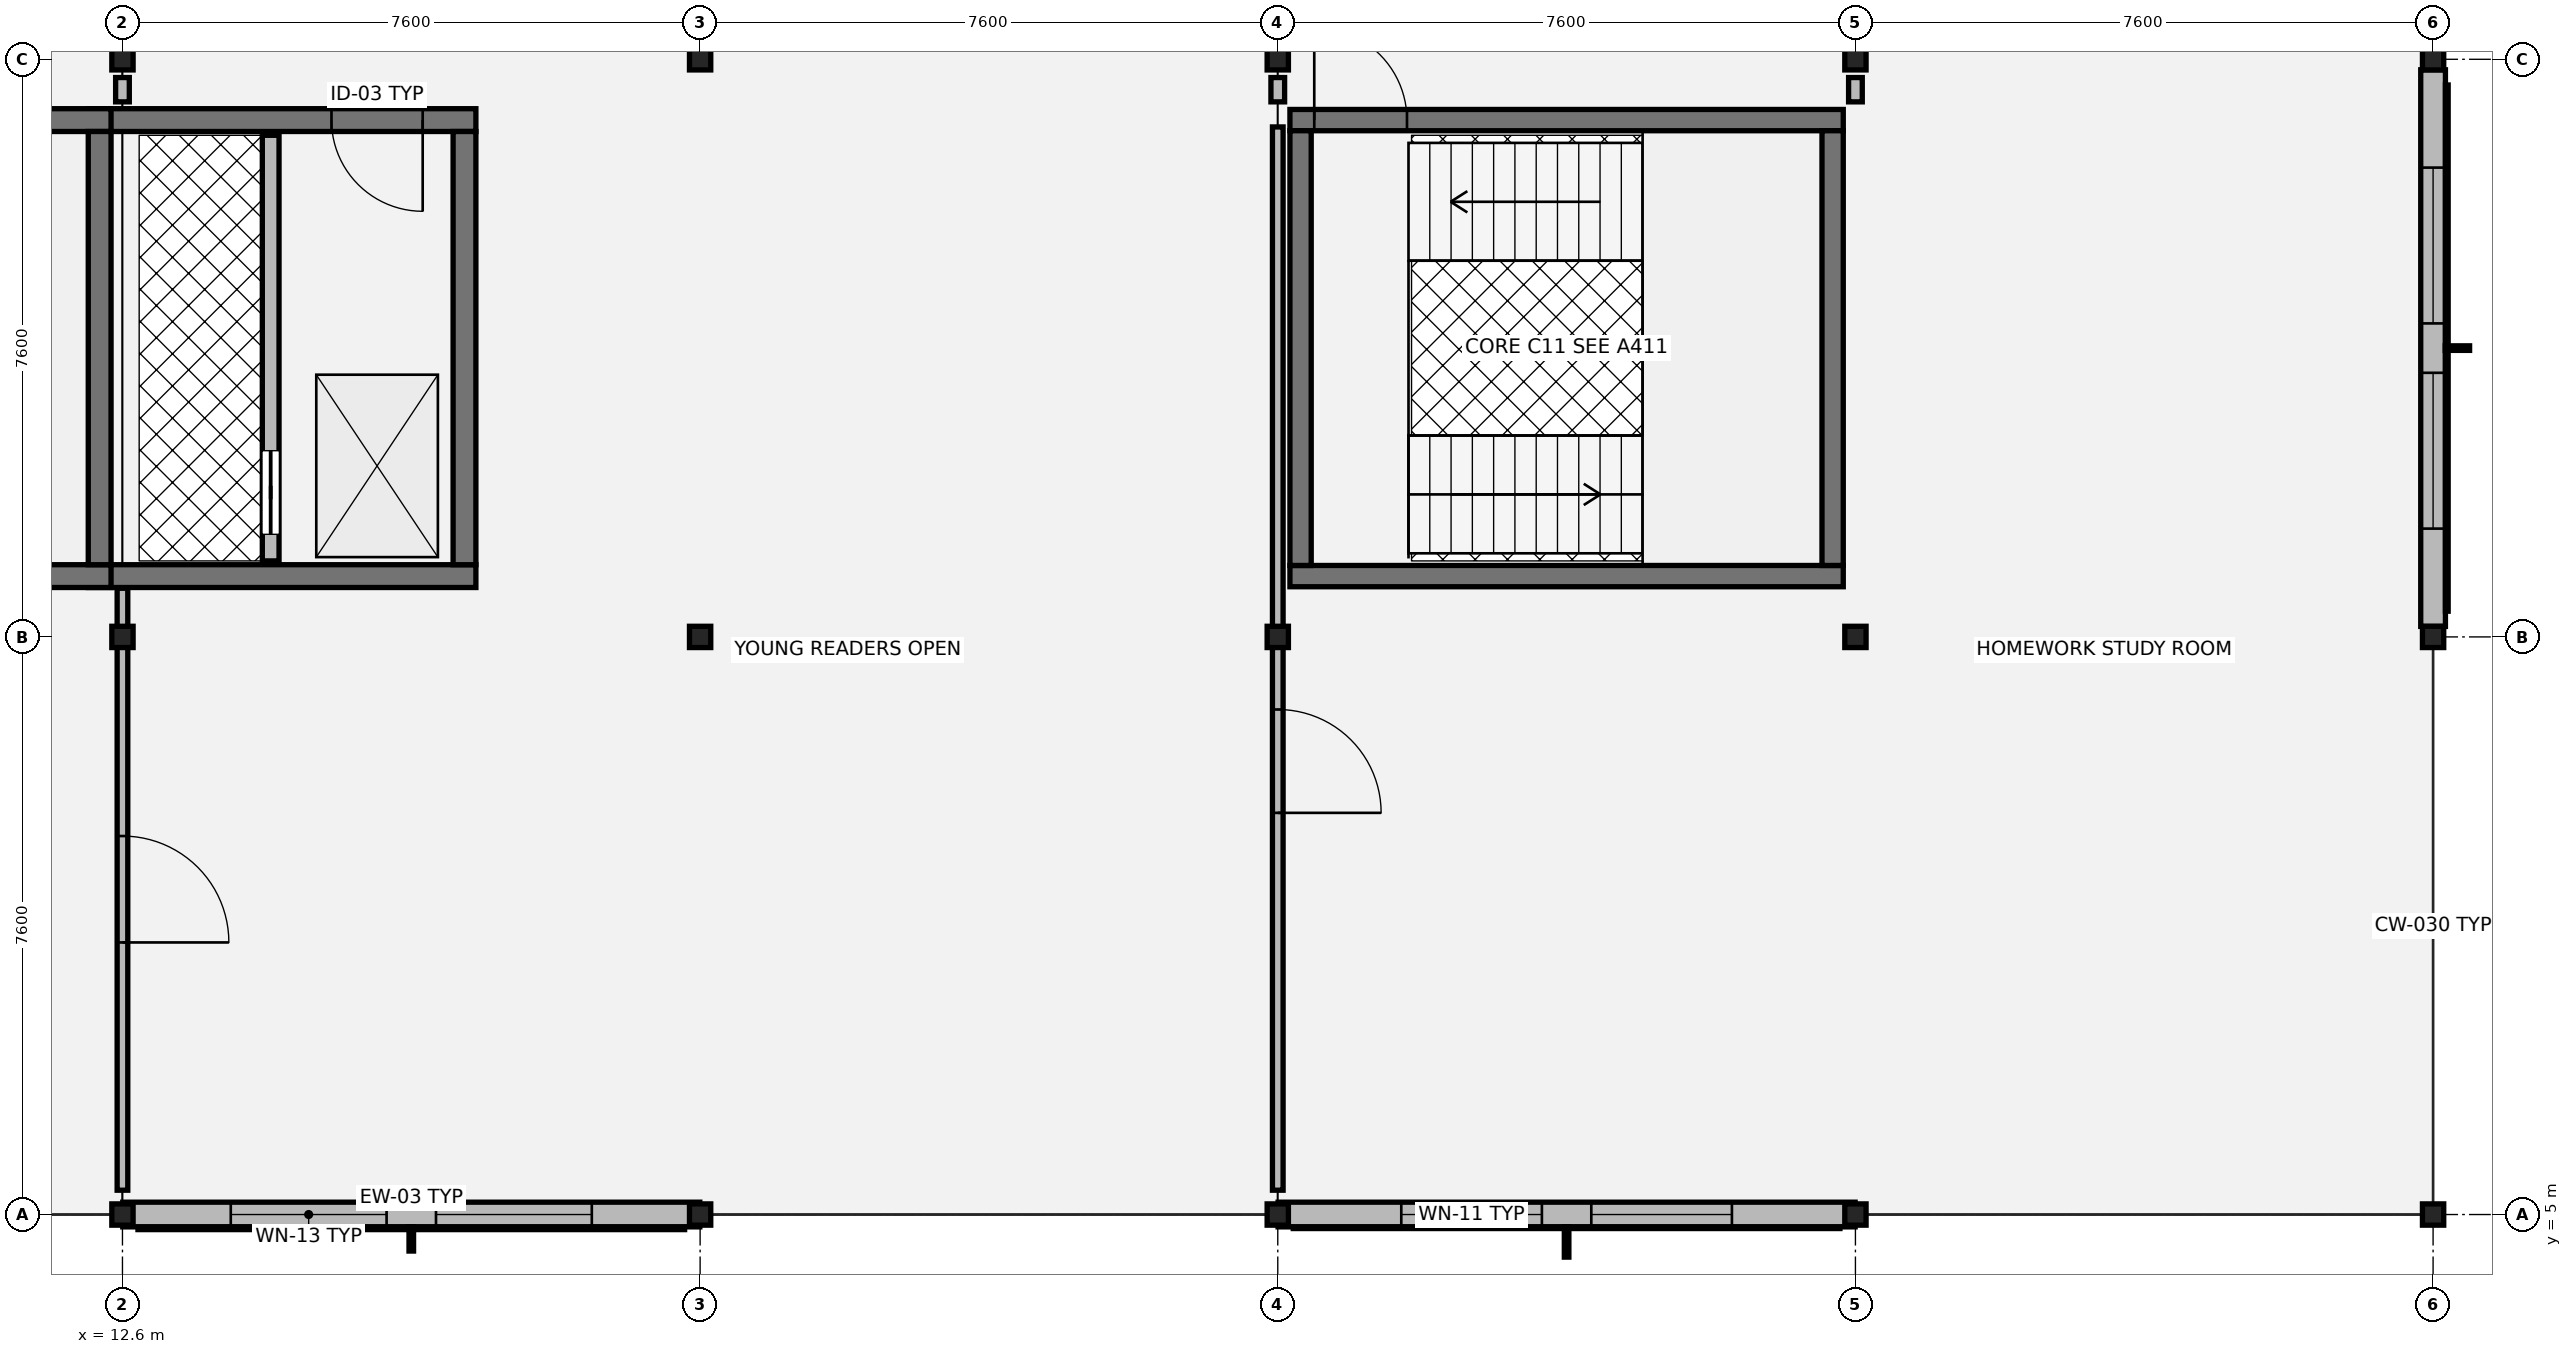
"""IFC4 building model, lengths in metres.
Left out: names, types, materials, properties, quantities, classifications, styles, units other than length and angle.
Written with IfcOpenShell. Run it as: python <this file> out.ifc"""

import sys

from ifc_helpers import new_model, si_unit, direction, frame, frame_2d, origin, origin_2d, place, context, subcontext, project, spatial, rectangle, i_section, extrude, element, fill, save


model = new_model("IFC4")
c1 = context("Model", 3, precision=1e-05, world=origin(), true_north=direction((0.0, 1.0)))
c2 = subcontext(c1, "Body", "Model", "MODEL_VIEW")
j1 = project(units=[si_unit("LENGTHUNIT", "METRE"), si_unit("PLANEANGLEUNIT", "RADIAN")], contexts=[c1])
p1 = place(None, origin())
s1 = spatial("IfcSite", under=j1, at=p1, CompositionType="ELEMENT")
p2 = place(p1, origin())
s2 = spatial("IfcBuilding", under=s1, at=p2, CompositionType="ELEMENT")
p3 = place(p2, frame((0.0, 0.0, 5.1)))
s3 = spatial("IfcBuildingStorey", under=s2, at=p3, CompositionType="ELEMENT", Elevation=5.1)
for number, where, z_axis, x_axis in (
    (1, (12.6, 5.0, 0.0), (0.0, 0.0, 1.0), (1.0, 0.0, 0.0)),
    (2, (12.6, 12.6, 0.0), (0.0, 0.0, 1.0), (1.0, 0.0, 0.0)),
    (3, (12.6, 20.2, 0.0), (0.0, 0.0, 1.0), (1.0, 0.0, 0.0)),
    (4, (20.2, 5.0, 0.0), (0.0, 0.0, 1.0), (1.0, 0.0, 0.0)),
    (5, (20.2, 12.6, 0.0), (0.0, 0.0, 1.0), (1.0, 0.0, 0.0)),
    (6, (20.2, 20.2, 0.0), (0.0, 0.0, 1.0), (1.0, 0.0, 0.0)),
    (7, (27.8, 5.0, 0.0), (0.0, 0.0, 1.0), (1.0, 0.0, 0.0)),
    (8, (27.8, 12.6, 0.0), (0.0, 0.0, 1.0), (1.0, 0.0, 0.0)),
    (9, (27.8, 20.2, 0.0), (0.0, 0.0, 1.0), (1.0, 0.0, 0.0)),
    (10, (35.4, 5.0, 0.0), (0.0, 0.0, 1.0), (1.0, 0.0, 0.0)),
    (11, (35.4, 12.6, 0.0), (0.0, 0.0, 1.0), (1.0, 0.0, 0.0)),
    (12, (35.4, 20.2, 0.0), (0.0, 0.0, 1.0), (1.0, 0.0, 0.0)),
    (13, (43.0, 5.0, 0.0), (0.0, 0.0, 1.0), (1.0, 0.0, 0.0)),
    (14, (43.0, 12.6, 0.0), (0.0, 0.0, 1.0), (1.0, 0.0, 0.0)),
    (15, (43.0, 20.2, 0.0), (0.0, 0.0, 1.0), (1.0, 0.0, 0.0)),
):
    element("IfcColumn", number, at=place(p3, frame(where, z_axis=z_axis, x_axis=x_axis)), inside=s3, PredefinedType="COLUMN", context=c2, shape_type="SweptSolid", body=[
        extrude(i_section(OverallWidth=0.28, OverallDepth=0.28, WebThickness=0.01, FlangeThickness=0.018, at=origin_2d()), origin(), (0.0, 0.0, 1.0), 4.055),
    ])
p4 = place(p3, frame((12.604, 5.0, 0.0), z_axis=(0.0, 0.0, 1.0), x_axis=(1.0, 0.0, 0.0)))
e16 = element("IfcWall", 16, at=p4, inside=s3, PredefinedType="SOLIDWALL", context=c2, shape_type="SweptSolid", body=[
    extrude(rectangle(XDim=7.592, YDim=0.325, at=frame_2d((3.796, 0.0))), origin(), (0.0, 0.0, 1.0), 3.48),
])
p5 = place(p4, frame((1.421, 0.0, 0.8)))
e17 = element("IfcOpeningElement", 17, at=p5, cuts=e16, PredefinedType="OPENING", context=c2, shape_type="SweptSolid", body=[
    extrude(rectangle(XDim=2.05, YDim=2.18, at=frame_2d((1.025, 1.09))), frame((0.0, 0.172, 0.0), z_axis=(0.0, -1.0, 0.0), x_axis=(1.0, 0.0, 0.0)), (0.0, 0.0, 1.0), 0.345),
])
p6 = place(p4, frame((4.121, 0.0, 0.8)))
e18 = element("IfcOpeningElement", 18, at=p6, cuts=e16, PredefinedType="OPENING", context=c2, shape_type="SweptSolid", body=[
    extrude(rectangle(XDim=2.05, YDim=2.18, at=frame_2d((1.025, 1.09))), frame((0.0, 0.172, 0.0), z_axis=(0.0, -1.0, 0.0), x_axis=(1.0, 0.0, 0.0)), (0.0, 0.0, 1.0), 0.345),
])
p7 = place(p3, frame((27.804, 5.0, 0.0), z_axis=(0.0, 0.0, 1.0), x_axis=(1.0, 0.0, 0.0)))
e19 = element("IfcWall", 19, at=p7, inside=s3, PredefinedType="SOLIDWALL", context=c2, shape_type="SweptSolid", body=[
    extrude(rectangle(XDim=7.592, YDim=0.325, at=frame_2d((3.796, 0.0))), origin(), (0.0, 0.0, 1.0), 3.48),
])
p8 = place(p7, frame((1.621, 0.0, 0.8)))
e20 = element("IfcOpeningElement", 20, at=p8, cuts=e19, PredefinedType="OPENING", context=c2, shape_type="SweptSolid", body=[
    extrude(rectangle(XDim=1.85, YDim=2.1, at=frame_2d((0.925, 1.05))), frame((0.0, 0.172, 0.0), z_axis=(0.0, -1.0, 0.0), x_axis=(1.0, 0.0, 0.0)), (0.0, 0.0, 1.0), 0.345),
])
p9 = place(p7, frame((4.121, 0.0, 0.8)))
e21 = element("IfcOpeningElement", 21, at=p9, cuts=e19, PredefinedType="OPENING", context=c2, shape_type="SweptSolid", body=[
    extrude(rectangle(XDim=1.85, YDim=2.1, at=frame_2d((0.925, 1.05))), frame((0.0, 0.172, 0.0), z_axis=(0.0, -1.0, 0.0), x_axis=(1.0, 0.0, 0.0)), (0.0, 0.0, 1.0), 0.345),
])
p10 = place(p3, frame((43.0, 12.738, 0.0), z_axis=(0.0, 0.0, 1.0), x_axis=(0.0, 1.0, 0.0)))
e22 = element("IfcWall", 22, at=p10, inside=s3, PredefinedType="SOLIDWALL", context=c2, shape_type="SweptSolid", body=[
    extrude(rectangle(XDim=7.324, YDim=0.325, at=frame_2d((3.662, 0.0))), origin(), (0.0, 0.0, 1.0), 3.48),
])
p11 = place(p10, frame((1.287, 0.0, 0.8)))
e23 = element("IfcOpeningElement", 23, at=p11, cuts=e22, PredefinedType="OPENING", context=c2, shape_type="SweptSolid", body=[
    extrude(rectangle(XDim=2.05, YDim=2.18, at=frame_2d((1.025, 1.09))), frame((0.0, 0.172, 0.0), z_axis=(0.0, -1.0, 0.0), x_axis=(1.0, 0.0, 0.0)), (0.0, 0.0, 1.0), 0.345),
])
p12 = place(p10, frame((3.987, 0.0, 0.8)))
e24 = element("IfcOpeningElement", 24, at=p12, cuts=e22, PredefinedType="OPENING", context=c2, shape_type="SweptSolid", body=[
    extrude(rectangle(XDim=2.05, YDim=2.18, at=frame_2d((1.025, 1.09))), frame((0.0, 0.172, 0.0), z_axis=(0.0, -1.0, 0.0), x_axis=(1.0, 0.0, 0.0)), (0.0, 0.0, 1.0), 0.345),
])
p13 = place(p3, frame((12.15, 13.4, 0.0), z_axis=(0.0, 0.0, 1.0), x_axis=(1.0, 0.0, 0.0)))
e25 = element("IfcWall", 25, at=p13, inside=s3, PredefinedType="SHEAR", context=c2, shape_type="SweptSolid", body=[
    extrude(rectangle(XDim=5.1, YDim=0.3, at=frame_2d((2.55, 0.0))), origin(), (0.0, 0.0, 1.0), 3.902),
])
p14 = place(p3, frame((17.25, 19.4, 0.0), z_axis=(0.0, 0.0, 1.0), x_axis=(-1.0, 0.0, 0.0)))
e26 = element("IfcWall", 26, at=p14, inside=s3, PredefinedType="SHEAR", context=c2, shape_type="SweptSolid", body=[
    extrude(rectangle(XDim=5.1, YDim=0.3, at=frame_2d((2.55, 0.0))), origin(), (0.0, 0.0, 1.0), 3.902),
])
p15 = place(p14, frame((0.7, 0.0, 0.0)))
e27 = element("IfcOpeningElement", 27, at=p15, cuts=e26, PredefinedType="OPENING", context=c2, shape_type="SweptSolid", body=[
    extrude(rectangle(XDim=1.2, YDim=2.16, at=frame_2d((0.6, 1.08))), frame((0.0, 0.16, 0.0), z_axis=(0.0, -1.0, 0.0), x_axis=(1.0, 0.0, 0.0)), (0.0, 0.0, 1.0), 0.32),
])
p16 = place(p3, frame((17.1, 13.55, 0.0), z_axis=(0.0, 0.0, 1.0), x_axis=(0.0, 1.0, 0.0)))
e28 = element("IfcWall", 28, at=p16, inside=s3, PredefinedType="SHEAR", context=c2, shape_type="SweptSolid", body=[
    extrude(rectangle(XDim=5.7, YDim=0.3, at=frame_2d((2.85, 0.0))), origin(), (0.0, 0.0, 1.0), 3.902),
])
p17 = place(p3, frame((14.55, 13.6, 0.0), z_axis=(0.0, 0.0, 1.0), x_axis=(0.0, 1.0, 0.0)))
e29 = element("IfcWall", 29, at=p17, inside=s3, PredefinedType="SOLIDWALL", context=c2, shape_type="SweptSolid", body=[
    extrude(rectangle(XDim=5.6, YDim=0.22, at=frame_2d((2.8, 0.0))), origin(), (0.0, 0.0, 1.0), 3.902),
])
p18 = place(p17, frame((0.35, 0.0, 0.0)))
e30 = element("IfcOpeningElement", 30, at=p18, cuts=e29, PredefinedType="OPENING", context=c2, shape_type="SweptSolid", body=[
    extrude(rectangle(XDim=1.1, YDim=2.15, at=frame_2d((0.55, 1.075))), frame((0.0, 0.12, 0.0), z_axis=(0.0, -1.0, 0.0), x_axis=(1.0, 0.0, 0.0)), (0.0, 0.0, 1.0), 0.24),
])
p19 = place(p3, frame((5.15, 13.4, 0.0), z_axis=(0.0, 0.0, 1.0), x_axis=(1.0, 0.0, 0.0)))
e31 = element("IfcWall", 31, at=p19, inside=s3, PredefinedType="SHEAR", context=c2, shape_type="SweptSolid", body=[
    extrude(rectangle(XDim=7.3, YDim=0.3, at=frame_2d((3.65, 0.0))), origin(), (0.0, 0.0, 1.0), 3.902),
])
p20 = place(p3, frame((5.15, 19.4, 0.0), z_axis=(0.0, 0.0, 1.0), x_axis=(1.0, 0.0, 0.0)))
e32 = element("IfcWall", 32, at=p20, inside=s3, PredefinedType="SHEAR", context=c2, shape_type="SweptSolid", body=[
    extrude(rectangle(XDim=7.3, YDim=0.3, at=frame_2d((3.65, 0.0))), origin(), (0.0, 0.0, 1.0), 3.902),
])
p21 = place(p20, frame((0.33, 0.0, 0.0)))
e33 = element("IfcOpeningElement", 33, at=p21, cuts=e32, PredefinedType="OPENING", context=c2, shape_type="SweptSolid", body=[
    extrude(rectangle(XDim=1.18, YDim=2.18, at=frame_2d((0.59, 1.09))), frame((0.0, 0.16, 0.0), z_axis=(0.0, -1.0, 0.0), x_axis=(1.0, 0.0, 0.0)), (0.0, 0.0, 1.0), 0.32),
])
p22 = place(p3, frame((12.3, 13.55, 0.0), z_axis=(0.0, 0.0, 1.0), x_axis=(0.0, 1.0, 0.0)))
e34 = element("IfcWall", 34, at=p22, inside=s3, PredefinedType="SHEAR", context=c2, shape_type="SweptSolid", body=[
    extrude(rectangle(XDim=5.7, YDim=0.3, at=frame_2d((2.85, 0.0))), origin(), (0.0, 0.0, 1.0), 3.902),
])
p23 = place(p3, frame((27.96, 13.4, 0.0), z_axis=(0.0, 0.0, 1.0), x_axis=(1.0, 0.0, 0.0)))
e35 = element("IfcWall", 35, at=p23, inside=s3, PredefinedType="SHEAR", context=c2, shape_type="SweptSolid", body=[
    extrude(rectangle(XDim=7.28, YDim=0.28, at=frame_2d((3.64, 0.0))), origin(), (0.0, 0.0, 1.0), 3.902),
])
p24 = place(p3, frame((27.96, 19.4, 0.0), z_axis=(0.0, 0.0, 1.0), x_axis=(1.0, 0.0, 0.0)))
e36 = element("IfcWall", 36, at=p24, inside=s3, PredefinedType="SHEAR", context=c2, shape_type="SweptSolid", body=[
    extrude(rectangle(XDim=7.28, YDim=0.28, at=frame_2d((3.64, 0.0))), origin(), (0.0, 0.0, 1.0), 3.902),
])
p25 = place(p24, frame((0.32, 0.0, 0.0)))
e37 = element("IfcOpeningElement", 37, at=p25, cuts=e36, PredefinedType="OPENING", context=c2, shape_type="SweptSolid", body=[
    extrude(rectangle(XDim=1.22, YDim=2.18, at=frame_2d((0.61, 1.09))), frame((0.0, 0.15, 0.0), z_axis=(0.0, -1.0, 0.0), x_axis=(1.0, 0.0, 0.0)), (0.0, 0.0, 1.0), 0.3),
])
for number, where, z_axis, x_axis in (
    (38, (28.1, 13.54, 0.0), (0.0, 0.0, 1.0), (0.0, 1.0, 0.0)),
    (39, (35.1, 13.54, 0.0), (0.0, 0.0, 1.0), (0.0, 1.0, 0.0)),
):
    element("IfcWall", number, at=place(p3, frame(where, z_axis=z_axis, x_axis=x_axis)), inside=s3, PredefinedType="SHEAR", context=c2, shape_type="SweptSolid", body=[
        extrude(rectangle(XDim=5.72, YDim=0.28, at=frame_2d((2.86, 0.0))), origin(), (0.0, 0.0, 1.0), 3.902),
    ])
for number, where, z_axis, x_axis in (
    (40, (12.6, 19.64, 0.0), (0.0, 0.0, 1.0), (0.0, 1.0, 0.0)),
    (41, (27.8, 19.64, 0.0), (0.0, 0.0, 1.0), (0.0, 1.0, 0.0)),
    (42, (35.4, 19.64, 0.0), (0.0, 0.0, 1.0), (0.0, 1.0, 0.0)),
):
    element("IfcWall", number, at=place(p3, frame(where, z_axis=z_axis, x_axis=x_axis)), inside=s3, PredefinedType="PARTITIONING", context=c2, shape_type="SweptSolid", body=[
        extrude(rectangle(XDim=0.32, YDim=0.18, at=frame_2d((0.16, 0.0))), origin(), (0.0, 0.0, 1.0), 3.18),
    ])
p26 = place(p3, frame((12.6, 5.32, 0.0), z_axis=(0.0, 0.0, 1.0), x_axis=(0.0, 1.0, 0.0)))
e43 = element("IfcWall", 43, at=p26, inside=s3, PredefinedType="PARTITIONING", context=c2, shape_type="SweptSolid", body=[
    extrude(rectangle(XDim=7.92, YDim=0.14, at=frame_2d((3.96, 0.0))), origin(), (0.0, 0.0, 1.0), 3.18),
])
p27 = place(p26, frame((3.26, 0.0, 0.0)))
e44 = element("IfcOpeningElement", 44, at=p27, cuts=e43, PredefinedType="OPENING", context=c2, shape_type="SweptSolid", body=[
    extrude(rectangle(XDim=1.4, YDim=2.22, at=frame_2d((0.7, 1.11))), frame((0.0, 0.08, 0.0), z_axis=(0.0, -1.0, 0.0), x_axis=(1.0, 0.0, 0.0)), (0.0, 0.0, 1.0), 0.16),
])
p28 = place(p3, frame((27.8, 5.32, 0.0), z_axis=(0.0, 0.0, 1.0), x_axis=(0.0, 1.0, 0.0)))
e45 = element("IfcWall", 45, at=p28, inside=s3, PredefinedType="PARTITIONING", context=c2, shape_type="SweptSolid", body=[
    extrude(rectangle(XDim=13.99, YDim=0.14, at=frame_2d((6.995, 0.0))), origin(), (0.0, 0.0, 1.0), 2.445),
])
p29 = place(p28, frame((4.965, 0.0, 0.0)))
e46 = element("IfcOpeningElement", 46, at=p29, cuts=e45, PredefinedType="OPENING", context=c2, shape_type="SweptSolid", body=[
    extrude(rectangle(XDim=1.36, YDim=2.2, at=frame_2d((0.68, 1.1))), frame((0.0, 0.08, 0.0), z_axis=(0.0, -1.0, 0.0), x_axis=(1.0, 0.0, 0.0)), (0.0, 0.0, 1.0), 0.16),
])
p30 = place(p5, origin())
e47 = element("IfcWindow", 47, at=p30, inside=s3, PartitioningType="SINGLE_PANEL", PredefinedType="WINDOW", context=c2, shape_type="SweptSolid", body=[
    extrude(rectangle(XDim=2.05, YDim=2.18, at=frame_2d((1.025, 1.09))), frame((0.0, 0.03, 0.0), z_axis=(0.0, -1.0, 0.0), x_axis=(1.0, 0.0, 0.0)), (0.0, 0.0, 1.0), 0.06),
])
fill(e17, e47)
p31 = place(p6, origin())
e48 = element("IfcWindow", 48, at=p31, inside=s3, PartitioningType="SINGLE_PANEL", PredefinedType="WINDOW", context=c2, shape_type="SweptSolid", body=[
    extrude(rectangle(XDim=2.05, YDim=2.18, at=frame_2d((1.025, 1.09))), frame((0.0, 0.03, 0.0), z_axis=(0.0, -1.0, 0.0), x_axis=(1.0, 0.0, 0.0)), (0.0, 0.0, 1.0), 0.06),
])
fill(e18, e48)
p32 = place(p8, origin())
e49 = element("IfcWindow", 49, at=p32, inside=s3, PartitioningType="SINGLE_PANEL", PredefinedType="WINDOW", context=c2, shape_type="SweptSolid", body=[
    extrude(rectangle(XDim=1.85, YDim=2.1, at=frame_2d((0.925, 1.05))), frame((0.0, 0.03, 0.0), z_axis=(0.0, -1.0, 0.0), x_axis=(1.0, 0.0, 0.0)), (0.0, 0.0, 1.0), 0.06),
])
fill(e20, e49)
p33 = place(p9, origin())
e50 = element("IfcWindow", 50, at=p33, inside=s3, PartitioningType="SINGLE_PANEL", PredefinedType="WINDOW", context=c2, shape_type="SweptSolid", body=[
    extrude(rectangle(XDim=1.85, YDim=2.1, at=frame_2d((0.925, 1.05))), frame((0.0, 0.03, 0.0), z_axis=(0.0, -1.0, 0.0), x_axis=(1.0, 0.0, 0.0)), (0.0, 0.0, 1.0), 0.06),
])
fill(e21, e50)
p34 = place(p11, origin())
e51 = element("IfcWindow", 51, at=p34, inside=s3, PartitioningType="SINGLE_PANEL", PredefinedType="WINDOW", context=c2, shape_type="SweptSolid", body=[
    extrude(rectangle(XDim=2.05, YDim=2.18, at=frame_2d((1.025, 1.09))), frame((0.0, 0.03, 0.0), z_axis=(0.0, -1.0, 0.0), x_axis=(1.0, 0.0, 0.0)), (0.0, 0.0, 1.0), 0.06),
])
fill(e23, e51)
p35 = place(p12, origin())
e52 = element("IfcWindow", 52, at=p35, inside=s3, PartitioningType="SINGLE_PANEL", PredefinedType="WINDOW", context=c2, shape_type="SweptSolid", body=[
    extrude(rectangle(XDim=2.05, YDim=2.18, at=frame_2d((1.025, 1.09))), frame((0.0, 0.03, 0.0), z_axis=(0.0, -1.0, 0.0), x_axis=(1.0, 0.0, 0.0)), (0.0, 0.0, 1.0), 0.06),
])
fill(e24, e52)
p36 = place(p15, origin())
e53 = element("IfcDoor", 53, at=p36, inside=s3, OperationType="SINGLE_SWING_LEFT", PredefinedType="DOOR", context=c2, shape_type="SweptSolid", body=[
    extrude(rectangle(XDim=1.2, YDim=2.16, at=frame_2d((0.6, 1.08))), frame((0.0, 0.025, 0.0), z_axis=(0.0, -1.0, 0.0), x_axis=(1.0, 0.0, 0.0)), (0.0, 0.0, 1.0), 0.05),
])
fill(e27, e53)
p37 = place(p18, origin())
e54 = element("IfcDoor", 54, at=p37, inside=s3, OperationType="SLIDING_TO_LEFT", PredefinedType="DOOR", context=c2, shape_type="SweptSolid", body=[
    extrude(rectangle(XDim=1.1, YDim=2.15, at=frame_2d((0.55, 1.075))), frame((0.0, 0.025, 0.0), z_axis=(0.0, -1.0, 0.0), x_axis=(1.0, 0.0, 0.0)), (0.0, 0.0, 1.0), 0.05),
])
fill(e30, e54)
p38 = place(p25, origin())
e55 = element("IfcDoor", 55, at=p38, inside=s3, OperationType="SINGLE_SWING_LEFT", PredefinedType="DOOR", context=c2, shape_type="SweptSolid", body=[
    extrude(rectangle(XDim=1.22, YDim=2.18, at=frame_2d((0.61, 1.09))), frame((0.0, 0.025, 0.0), z_axis=(0.0, -1.0, 0.0), x_axis=(1.0, 0.0, 0.0)), (0.0, 0.0, 1.0), 0.05),
])
fill(e37, e55)
p39 = place(p27, origin())
e56 = element("IfcDoor", 56, at=p39, inside=s3, OperationType="SINGLE_SWING_RIGHT", PredefinedType="DOOR", context=c2, shape_type="SweptSolid", body=[
    extrude(rectangle(XDim=1.4, YDim=2.22, at=frame_2d((0.7, 1.11))), frame((0.0, 0.025, 0.0), z_axis=(0.0, -1.0, 0.0), x_axis=(1.0, 0.0, 0.0)), (0.0, 0.0, 1.0), 0.05),
])
fill(e44, e56)
p40 = place(p29, origin())
e57 = element("IfcDoor", 57, at=p40, inside=s3, OperationType="SINGLE_SWING_RIGHT", PredefinedType="DOOR", context=c2, shape_type="SweptSolid", body=[
    extrude(rectangle(XDim=1.36, YDim=2.2, at=frame_2d((0.68, 1.1))), frame((0.0, 0.025, 0.0), z_axis=(0.0, -1.0, 0.0), x_axis=(1.0, 0.0, 0.0)), (0.0, 0.0, 1.0), 0.05),
])
fill(e46, e57)
save(model, sys.argv[1])
